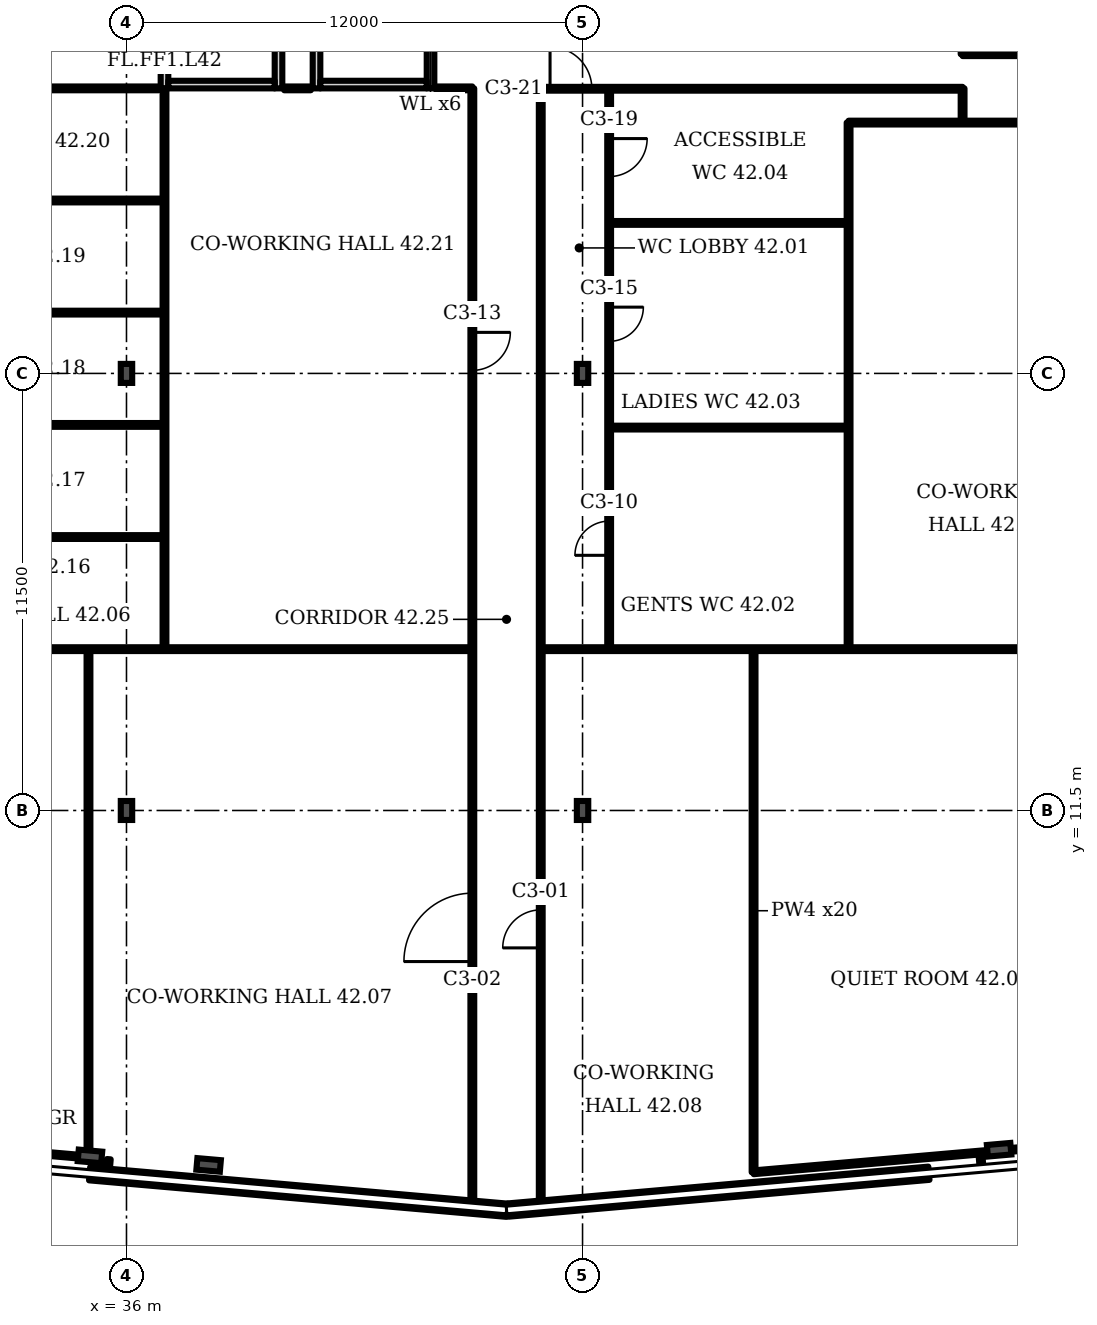
"""IFC4 building model, lengths in metres.
Left out: names, types, materials, properties, quantities, classifications, styles, units other than length and angle.
Written with IfcOpenShell. Run it as: python <this file> out.ifc"""

import sys

from ifc_helpers import new_model, si_unit, direction, frame, frame_2d, origin, origin_2d, place, context, subcontext, project, spatial, rectangle, i_section, extrude, element, fill, save


model = new_model("IFC4")
c1 = context("Model", 3, precision=1e-05, world=origin(), true_north=direction((0.0, 1.0)))
c2 = subcontext(c1, "Body", "Model", "MODEL_VIEW")
j1 = project(units=[si_unit("LENGTHUNIT", "METRE"), si_unit("PLANEANGLEUNIT", "RADIAN")], contexts=[c1])
p1 = place(None, origin())
s1 = spatial("IfcSite", under=j1, at=p1, CompositionType="ELEMENT")
p2 = place(p1, origin())
s2 = spatial("IfcBuilding", under=s1, at=p2, CompositionType="ELEMENT")
p3 = place(p2, frame((0.0, 0.0, 173.5)))
s3 = spatial("IfcBuildingStorey", under=s2, at=p3, CompositionType="ELEMENT", Elevation=173.5)
for number, where, z_axis, x_axis in (
    (1, (35.039, 2.399, 0.0), (0.0, 0.0, 1.0), (-0.087, -0.996, 0.0)),
    (2, (38.161, 2.174, 0.0), (0.0, 0.0, 1.0), (-0.087, -0.996, 0.0)),
    (3, (58.961, 2.573, 0.0), (0.0, 0.0, 1.0), (0.087, -0.996, 0.0)),
):
    element("IfcColumn", number, at=place(p3, frame(where, z_axis=z_axis, x_axis=x_axis)), inside=s3, PredefinedType="COLUMN", context=c2, shape_type="SweptSolid", body=[
        extrude(i_section(OverallWidth=0.305, OverallDepth=0.62, WebThickness=0.021, FlangeThickness=0.04, FilletRadius=0.027, at=origin_2d()), origin(), (0.0, 0.0, 1.0), 3.6),
    ])
for number, where, z_axis, x_axis in (
    (4, (36.0, 11.5, 0.0), (0.0, 0.0, 1.0), (1.0, 0.0, 0.0)),
    (5, (48.0, 11.5, 0.0), (0.0, 0.0, 1.0), (1.0, 0.0, 0.0)),
    (6, (36.0, 23.0, 0.0), (0.0, 0.0, 1.0), (1.0, 0.0, 0.0)),
    (7, (48.0, 23.0, 0.0), (0.0, 0.0, 1.0), (1.0, 0.0, 0.0)),
):
    element("IfcColumn", number, at=place(p3, frame(where, z_axis=z_axis, x_axis=x_axis)), inside=s3, PredefinedType="COLUMN", context=c2, shape_type="SweptSolid", body=[
        extrude(i_section(OverallWidth=0.3, OverallDepth=0.5, WebThickness=0.014, FlangeThickness=0.028, FilletRadius=0.027, at=origin_2d()), origin(), (0.0, 0.0, 1.0), 3.6),
    ])
p4 = place(p3, frame((35.03, 1.943, 0.0), z_axis=(0.0, 0.0, 1.0), x_axis=(0.996199, -0.08714, 0.0)))
e8 = element("IfcWall", 8, at=p4, inside=s3, PredefinedType="SOLIDWALL", context=c2, shape_type="SweptSolid", body=[
    extrude(rectangle(XDim=11.028, YDim=0.35, at=frame_2d((5.514, 0.0))), origin(), (0.0, 0.0, 1.0), 1.0),
])
p5 = place(p3, frame((46.045, 0.987, 0.0), z_axis=(0.0, 0.0, 1.0), x_axis=(0.996193, 0.087171, 0.0)))
e9 = element("IfcWall", 9, at=p5, inside=s3, PredefinedType="SOLIDWALL", context=c2, shape_type="SweptSolid", body=[
    extrude(rectangle(XDim=11.11, YDim=0.35, at=frame_2d((5.555, 0.0))), origin(), (0.0, 0.0, 1.0), 1.0),
])
p6 = place(p3, frame((37.0, 30.5, 0.0), z_axis=(0.0, 0.0, 1.0), x_axis=(0.0, 1.0, 0.0)))
e10 = element("IfcWall", 10, at=p6, inside=s3, PredefinedType="PARTITIONING", context=c2, shape_type="SweptSolid", body=[
    extrude(rectangle(XDim=3.5, YDim=0.2, at=frame_2d((1.75, 0.0))), origin(), (0.0, 0.0, 1.0), 3.2),
])
p7 = place(p6, frame((1.2, 0.0, 0.0)))
e11 = element("IfcOpeningElement", 11, at=p7, cuts=e10, PredefinedType="OPENING", context=c2, shape_type="SweptSolid", body=[
    extrude(rectangle(XDim=1.1, YDim=2.1, at=frame_2d((0.55, 1.05))), frame((0.0, 0.11, 0.0), z_axis=(0.0, -1.0, 0.0), x_axis=(1.0, 0.0, 0.0)), (0.0, 0.0, 1.0), 0.22),
])
p8 = place(p3, frame((40.0, 30.5, 0.0), z_axis=(0.0, 0.0, 1.0), x_axis=(0.0, 1.0, 0.0)))
e12 = element("IfcWall", 12, at=p8, inside=s3, PredefinedType="PARTITIONING", context=c2, shape_type="SweptSolid", body=[
    extrude(rectangle(XDim=3.5, YDim=0.2, at=frame_2d((1.75, 0.0))), origin(), (0.0, 0.0, 1.0), 3.2),
])
p9 = place(p3, frame((37.1, 30.6, 0.0), z_axis=(0.0, 0.0, 1.0), x_axis=(1.0, 0.0, 0.0)))
e13 = element("IfcWall", 13, at=p9, inside=s3, PredefinedType="PARTITIONING", context=c2, shape_type="SweptSolid", body=[
    extrude(rectangle(XDim=2.8, YDim=0.2, at=frame_2d((1.4, 0.0))), origin(), (0.0, 0.0, 1.0), 3.2),
])
p10 = place(p3, frame((41.0, 30.5, 0.0), z_axis=(0.0, 0.0, 1.0), x_axis=(0.0, 1.0, 0.0)))
e14 = element("IfcWall", 14, at=p10, inside=s3, PredefinedType="PARTITIONING", context=c2, shape_type="SweptSolid", body=[
    extrude(rectangle(XDim=3.5, YDim=0.2, at=frame_2d((1.75, 0.0))), origin(), (0.0, 0.0, 1.0), 3.2),
])
p11 = place(p3, frame((44.0, 30.5, 0.0), z_axis=(0.0, 0.0, 1.0), x_axis=(0.0, 1.0, 0.0)))
e15 = element("IfcWall", 15, at=p11, inside=s3, PredefinedType="PARTITIONING", context=c2, shape_type="SweptSolid", body=[
    extrude(rectangle(XDim=3.5, YDim=0.2, at=frame_2d((1.75, 0.0))), origin(), (0.0, 0.0, 1.0), 3.2),
])
p12 = place(p11, frame((1.2, 0.0, 0.0)))
e16 = element("IfcOpeningElement", 16, at=p12, cuts=e15, PredefinedType="OPENING", context=c2, shape_type="SweptSolid", body=[
    extrude(rectangle(XDim=1.1, YDim=2.1, at=frame_2d((0.55, 1.05))), frame((0.0, 0.11, 0.0), z_axis=(0.0, -1.0, 0.0), x_axis=(1.0, 0.0, 0.0)), (0.0, 0.0, 1.0), 0.22),
])
p13 = place(p3, frame((41.1, 30.6, 0.0), z_axis=(0.0, 0.0, 1.0), x_axis=(1.0, 0.0, 0.0)))
e17 = element("IfcWall", 17, at=p13, inside=s3, PredefinedType="PARTITIONING", context=c2, shape_type="SweptSolid", body=[
    extrude(rectangle(XDim=2.8, YDim=0.2, at=frame_2d((1.4, 0.0))), origin(), (0.0, 0.0, 1.0), 3.2),
])
p14 = place(p3, frame((27.4, 15.745, 0.0), z_axis=(0.0, 0.0, 1.0), x_axis=(1.0, 0.0, 0.0)))
e18 = element("IfcWall", 18, at=p14, inside=s3, PredefinedType="PARTITIONING", context=c2, shape_type="SweptSolid", body=[
    extrude(rectangle(XDim=17.7, YDim=0.1, at=frame_2d((8.85, 0.0))), origin(), (0.0, 0.0, 1.0), 3.2),
])
for number, where, z_axis, x_axis in (
    (19, (27.4, 18.695, 0.0), (0.0, 0.0, 1.0), (1.0, 0.0, 0.0)),
    (20, (27.4, 21.645, 0.0), (0.0, 0.0, 1.0), (1.0, 0.0, 0.0)),
    (21, (27.4, 24.6, 0.0), (0.0, 0.0, 1.0), (1.0, 0.0, 0.0)),
    (22, (27.4, 27.55, 0.0), (0.0, 0.0, 1.0), (1.0, 0.0, 0.0)),
):
    element("IfcWall", number, at=place(p3, frame(where, z_axis=z_axis, x_axis=x_axis)), inside=s3, PredefinedType="PARTITIONING", context=c2, shape_type="SweptSolid", body=[
        extrude(rectangle(XDim=9.6, YDim=0.1, at=frame_2d((4.8, 0.0))), origin(), (0.0, 0.0, 1.0), 3.2),
    ])
p15 = place(p3, frame((27.4, 30.5, 0.0), z_axis=(0.0, 0.0, 1.0), x_axis=(1.0, 0.0, 0.0)))
e23 = element("IfcWall", 23, at=p15, inside=s3, PredefinedType="PARTITIONING", context=c2, shape_type="SweptSolid", body=[
    extrude(rectangle(XDim=9.45, YDim=0.1, at=frame_2d((4.725, 0.0))), origin(), (0.0, 0.0, 1.0), 3.2),
])
p16 = place(p15, frame((2.87, 0.0, 0.0)))
e24 = element("IfcOpeningElement", 24, at=p16, cuts=e23, PredefinedType="OPENING", context=c2, shape_type="SweptSolid", body=[
    extrude(rectangle(XDim=1.0, YDim=2.1, at=frame_2d((0.5, 1.05))), frame((0.0, 0.06, 0.0), z_axis=(0.0, -1.0, 0.0), x_axis=(1.0, 0.0, 0.0)), (0.0, 0.0, 1.0), 0.12),
])
p17 = place(p3, frame((35.0, 2.37, 0.0), z_axis=(0.0, 0.0, 1.0), x_axis=(-0.996265, 0.086343, 0.0)))
e25 = element("IfcWall", 25, at=p17, inside=s3, PredefinedType="PARTITIONING", context=c2, shape_type="SweptSolid", body=[
    extrude(rectangle(XDim=1.948, YDim=0.1, at=frame_2d((0.974, 0.0))), origin(), (0.0, 0.0, 1.0), 2.58),
])
p18 = place(p3, frame((35.0, 2.37, 0.0), z_axis=(0.0, 0.0, 1.0), x_axis=(0.0, 1.0, 0.0)))
e26 = element("IfcWall", 26, at=p18, inside=s3, PredefinedType="PARTITIONING", context=c2, shape_type="SweptSolid", body=[
    extrude(rectangle(XDim=13.375, YDim=0.1, at=frame_2d((6.688, 0.0))), origin(), (0.0, 0.0, 1.0), 3.2),
])
p19 = place(p3, frame((35.502, 1.927, 0.0), z_axis=(0.0, 0.0, 1.0), x_axis=(0.083045, 0.996542, 0.0)))
e27 = element("IfcWall", 27, at=p19, inside=s3, PredefinedType="PARTITIONING", context=c2, shape_type="SweptSolid", body=[
    extrude(rectangle(XDim=0.4, YDim=0.1, at=frame_2d((0.2, 0.0))), origin(), (0.0, 0.0, 1.0), 3.2),
])
p20 = place(p3, frame((37.0, 15.745, 0.0), z_axis=(0.0, 0.0, 1.0), x_axis=(0.0, 1.0, 0.0)))
e28 = element("IfcWall", 28, at=p20, inside=s3, PredefinedType="PARTITIONING", context=c2, shape_type="SweptSolid", body=[
    extrude(rectangle(XDim=14.755, YDim=0.1, at=frame_2d((7.377, 0.0))), origin(), (0.0, 0.0, 1.0), 3.2),
])
p21 = place(p3, frame((45.1, 1.087, 0.0), z_axis=(0.0, 0.0, 1.0), x_axis=(0.0, 1.0, 0.0)))
e29 = element("IfcWall", 29, at=p21, inside=s3, PredefinedType="PARTITIONING", context=c2, shape_type="SweptSolid", body=[
    extrude(rectangle(XDim=29.413, YDim=0.1, at=frame_2d((14.707, 0.0))), origin(), (0.0, 0.0, 1.0), 3.2),
])
p22 = place(p21, frame((6.438, 0.0, 0.0)))
e30 = element("IfcOpeningElement", 30, at=p22, cuts=e29, PredefinedType="OPENING", context=c2, shape_type="SweptSolid", body=[
    extrude(rectangle(XDim=1.8, YDim=2.1, at=frame_2d((0.9, 1.05))), frame((0.0, 0.06, 0.0), z_axis=(0.0, -1.0, 0.0), x_axis=(1.0, 0.0, 0.0)), (0.0, 0.0, 1.0), 0.12),
])
p23 = place(p21, frame((21.993, 0.0, 0.0)))
e31 = element("IfcOpeningElement", 31, at=p23, cuts=e29, PredefinedType="OPENING", context=c2, shape_type="SweptSolid", body=[
    extrude(rectangle(XDim=1.0, YDim=2.1, at=frame_2d((0.5, 1.05))), frame((0.0, 0.06, 0.0), z_axis=(0.0, -1.0, 0.0), x_axis=(1.0, 0.0, 0.0)), (0.0, 0.0, 1.0), 0.12),
])
p24 = place(p3, frame((46.9, 1.087, 0.0), z_axis=(0.0, 0.0, 1.0), x_axis=(0.0, 1.0, 0.0)))
e32 = element("IfcWall", 32, at=p24, inside=s3, PredefinedType="PARTITIONING", context=c2, shape_type="SweptSolid", body=[
    extrude(rectangle(XDim=29.403, YDim=0.1, at=frame_2d((14.702, 0.0))), origin(), (0.0, 0.0, 1.0), 3.2),
])
p25 = place(p24, frame((6.798, 0.0, 0.0)))
e33 = element("IfcOpeningElement", 33, at=p25, cuts=e32, PredefinedType="OPENING", context=c2, shape_type="SweptSolid", body=[
    extrude(rectangle(XDim=1.0, YDim=2.1, at=frame_2d((0.5, 1.05))), frame((0.0, 0.06, 0.0), z_axis=(0.0, -1.0, 0.0), x_axis=(1.0, 0.0, 0.0)), (0.0, 0.0, 1.0), 0.12),
])
p26 = place(p3, frame((46.91, 15.745, 0.0), z_axis=(0.0, 0.0, 1.0), x_axis=(1.0, 0.0, 0.0)))
e34 = element("IfcWall", 34, at=p26, inside=s3, PredefinedType="PARTITIONING", context=c2, shape_type="SweptSolid", body=[
    extrude(rectangle(XDim=17.69, YDim=0.1, at=frame_2d((8.845, 0.0))), origin(), (0.0, 0.0, 1.0), 3.2),
])
p27 = place(p3, frame((46.91, 30.49, 0.0), z_axis=(0.0, 0.0, 1.0), x_axis=(1.0, 0.0, 0.0)))
e35 = element("IfcWall", 35, at=p27, inside=s3, PredefinedType="PARTITIONING", context=c2, shape_type="SweptSolid", body=[
    extrude(rectangle(XDim=11.09, YDim=0.1, at=frame_2d((5.545, 0.0))), origin(), (0.0, 0.0, 1.0), 3.2),
])
p28 = place(p27, frame((0.235, 0.0, 0.0)))
e36 = element("IfcOpeningElement", 36, at=p28, cuts=e35, PredefinedType="OPENING", context=c2, shape_type="SweptSolid", body=[
    extrude(rectangle(XDim=1.1, YDim=2.1, at=frame_2d((0.55, 1.05))), frame((0.0, 0.06, 0.0), z_axis=(0.0, -1.0, 0.0), x_axis=(1.0, 0.0, 0.0)), (0.0, 0.0, 1.0), 0.12),
])
p29 = place(p3, frame((48.7, 15.745, 0.0), z_axis=(0.0, 0.0, 1.0), x_axis=(0.0, 1.0, 0.0)))
e37 = element("IfcWall", 37, at=p29, inside=s3, PredefinedType="PARTITIONING", context=c2, shape_type="SweptSolid", body=[
    extrude(rectangle(XDim=14.745, YDim=0.1, at=frame_2d((7.373, 0.0))), origin(), (0.0, 0.0, 1.0), 3.2),
])
p30 = place(p29, frame((2.469, 0.0, 0.0)))
e38 = element("IfcOpeningElement", 38, at=p30, cuts=e37, PredefinedType="OPENING", context=c2, shape_type="SweptSolid", body=[
    extrude(rectangle(XDim=0.9, YDim=2.1, at=frame_2d((0.45, 1.05))), frame((0.0, 0.06, 0.0), z_axis=(0.0, -1.0, 0.0), x_axis=(1.0, 0.0, 0.0)), (0.0, 0.0, 1.0), 0.12),
])
p31 = place(p29, frame((8.099, 0.0, 0.0)))
e39 = element("IfcOpeningElement", 39, at=p31, cuts=e37, PredefinedType="OPENING", context=c2, shape_type="SweptSolid", body=[
    extrude(rectangle(XDim=0.9, YDim=2.1, at=frame_2d((0.45, 1.05))), frame((0.0, 0.06, 0.0), z_axis=(0.0, -1.0, 0.0), x_axis=(1.0, 0.0, 0.0)), (0.0, 0.0, 1.0), 0.12),
])
p32 = place(p29, frame((12.434, 0.0, 0.0)))
e40 = element("IfcOpeningElement", 40, at=p32, cuts=e37, PredefinedType="OPENING", context=c2, shape_type="SweptSolid", body=[
    extrude(rectangle(XDim=1.0, YDim=2.1, at=frame_2d((0.5, 1.05))), frame((0.0, 0.06, 0.0), z_axis=(0.0, -1.0, 0.0), x_axis=(1.0, 0.0, 0.0)), (0.0, 0.0, 1.0), 0.12),
])
for number, where, z_axis, x_axis in (
    (41, (48.7, 21.575, 0.0), (0.0, 0.0, 1.0), (1.0, 0.0, 0.0)),
    (42, (48.7, 26.96, 0.0), (0.0, 0.0, 1.0), (1.0, 0.0, 0.0)),
):
    element("IfcWall", number, at=place(p3, frame(where, z_axis=z_axis, x_axis=x_axis)), inside=s3, PredefinedType="PARTITIONING", context=c2, shape_type="SweptSolid", body=[
        extrude(rectangle(XDim=6.3, YDim=0.1, at=frame_2d((3.15, 0.0))), origin(), (0.0, 0.0, 1.0), 3.2),
    ])
p33 = place(p3, frame((52.5, 1.98, 0.0), z_axis=(0.0, 0.0, 1.0), x_axis=(0.0, 1.0, 0.0)))
e43 = element("IfcWall", 43, at=p33, inside=s3, PredefinedType="PARTITIONING", context=c2, shape_type="SweptSolid", body=[
    extrude(rectangle(XDim=13.765, YDim=0.1, at=frame_2d((6.883, 0.0))), origin(), (0.0, 0.0, 1.0), 3.2),
])
p34 = place(p3, frame((52.5, 1.98, 0.0), z_axis=(0.0, 0.0, 1.0), x_axis=(0.99622, 0.086844, 0.0)))
e44 = element("IfcWall", 44, at=p34, inside=s3, PredefinedType="PARTITIONING", context=c2, shape_type="SweptSolid", body=[
    extrude(rectangle(XDim=9.328, YDim=0.1, at=frame_2d((4.664, 0.0))), origin(), (0.0, 0.0, 1.0), 2.58),
])
p35 = place(p3, frame((55.0, 15.745, 0.0), z_axis=(0.0, 0.0, 1.0), x_axis=(0.0, 1.0, 0.0)))
e45 = element("IfcWall", 45, at=p35, inside=s3, PredefinedType="PARTITIONING", context=c2, shape_type="SweptSolid", body=[
    extrude(rectangle(XDim=13.855, YDim=0.1, at=frame_2d((6.927, 0.0))), origin(), (0.0, 0.0, 1.0), 3.2),
])
p36 = place(p3, frame((55.0, 29.6, 0.0), z_axis=(0.0, 0.0, 1.0), x_axis=(1.0, 0.0, 0.0)))
e46 = element("IfcWall", 46, at=p36, inside=s3, PredefinedType="PARTITIONING", context=c2, shape_type="SweptSolid", body=[
    extrude(rectangle(XDim=6.44, YDim=0.1, at=frame_2d((3.22, 0.0))), origin(), (0.0, 0.0, 1.0), 3.2),
])
p37 = place(p3, frame((58.0, 29.6, 0.0), z_axis=(0.0, 0.0, 1.0), x_axis=(0.0, 1.0, 0.0)))
e47 = element("IfcWall", 47, at=p37, inside=s3, PredefinedType="PARTITIONING", context=c2, shape_type="SweptSolid", body=[
    extrude(rectangle(XDim=0.9, YDim=0.1, at=frame_2d((0.45, 0.0))), origin(), (0.0, 0.0, 1.0), 3.2),
])
p38 = place(p3, frame((58.0, 31.4, 0.0), z_axis=(0.0, 0.0, 1.0), x_axis=(0.0, 1.0, 0.0)))
e48 = element("IfcWall", 48, at=p38, inside=s3, PredefinedType="PARTITIONING", context=c2, shape_type="SweptSolid", body=[
    extrude(rectangle(XDim=2.58, YDim=0.1, at=frame_2d((1.29, 0.0))), origin(), (0.0, 0.0, 1.0), 3.2),
])
p39 = place(p3, frame((58.0, 31.4, 0.0), z_axis=(0.0, 0.0, 1.0), x_axis=(1.0, 0.0, 0.0)))
e49 = element("IfcWall", 49, at=p39, inside=s3, PredefinedType="PARTITIONING", context=c2, shape_type="SweptSolid", body=[
    extrude(rectangle(XDim=8.4, YDim=0.1, at=frame_2d((4.2, 0.0))), origin(), (0.0, 0.0, 1.0), 3.2),
])
p40 = place(p39, frame((3.98, 0.0, 0.0)))
e50 = element("IfcOpeningElement", 50, at=p40, cuts=e49, PredefinedType="OPENING", context=c2, shape_type="SweptSolid", body=[
    extrude(rectangle(XDim=1.8, YDim=2.1, at=frame_2d((0.9, 1.05))), frame((0.0, 0.06, 0.0), z_axis=(0.0, -1.0, 0.0), x_axis=(1.0, 0.0, 0.0)), (0.0, 0.0, 1.0), 0.12),
])
p41 = place(p3, frame((58.498, 2.102, 0.0), z_axis=(0.0, 0.0, 1.0), x_axis=(-0.083045, 0.996542, 0.0)))
e51 = element("IfcWall", 51, at=p41, inside=s3, PredefinedType="PARTITIONING", context=c2, shape_type="SweptSolid", body=[
    extrude(rectangle(XDim=0.4, YDim=0.1, at=frame_2d((0.2, 0.0))), origin(), (0.0, 0.0, 1.0), 3.2),
])
p42 = place(p3, frame((40.15, 30.5, 0.0), z_axis=(0.0, 0.0, 1.0), x_axis=(1.0, 0.0, 0.0)))
e52 = element("IfcWall", 52, at=p42, inside=s3, PredefinedType="PARTITIONING", context=c2, shape_type="SweptSolid", body=[
    extrude(rectangle(XDim=0.7, YDim=0.1, at=frame_2d((0.35, 0.0))), origin(), (0.0, 0.0, 1.0), 3.2),
])
p43 = place(p3, frame((44.15, 30.5, 0.0), z_axis=(0.0, 0.0, 1.0), x_axis=(1.0, 0.0, 0.0)))
e53 = element("IfcWall", 53, at=p43, inside=s3, PredefinedType="PARTITIONING", context=c2, shape_type="SweptSolid", body=[
    extrude(rectangle(XDim=0.95, YDim=0.1, at=frame_2d((0.475, 0.0))), origin(), (0.0, 0.0, 1.0), 3.2),
])
p44 = place(p25, origin())
e54 = element("IfcDoor", 54, at=p44, inside=s3, OperationType="SINGLE_SWING_LEFT", PredefinedType="DOOR", context=c2, shape_type="SweptSolid", body=[
    extrude(rectangle(XDim=1.0, YDim=2.1, at=frame_2d((0.5, 1.05))), frame((0.0, 0.025, 0.0), z_axis=(0.0, -1.0, 0.0), x_axis=(1.0, 0.0, 0.0)), (0.0, 0.0, 1.0), 0.05),
])
fill(e33, e54)
p45 = place(p22, origin())
e55 = element("IfcDoor", 55, at=p45, inside=s3, OperationType="DOUBLE_DOOR_SINGLE_SWING", PredefinedType="DOOR", context=c2, shape_type="SweptSolid", body=[
    extrude(rectangle(XDim=1.8, YDim=2.1, at=frame_2d((0.9, 1.05))), frame((0.0, 0.025, 0.0), z_axis=(0.0, -1.0, 0.0), x_axis=(1.0, 0.0, 0.0)), (0.0, 0.0, 1.0), 0.05),
])
fill(e30, e55)
p46 = place(p30, origin())
e56 = element("IfcDoor", 56, at=p46, inside=s3, OperationType="SINGLE_SWING_LEFT", PredefinedType="DOOR", context=c2, shape_type="SweptSolid", body=[
    extrude(rectangle(XDim=0.9, YDim=2.1, at=frame_2d((0.45, 1.05))), frame((0.0, 0.025, 0.0), z_axis=(0.0, -1.0, 0.0), x_axis=(1.0, 0.0, 0.0)), (0.0, 0.0, 1.0), 0.05),
])
fill(e38, e56)
p47 = place(p23, origin())
e57 = element("IfcDoor", 57, at=p47, inside=s3, OperationType="SINGLE_SWING_RIGHT", PredefinedType="DOOR", context=c2, shape_type="SweptSolid", body=[
    extrude(rectangle(XDim=1.0, YDim=2.1, at=frame_2d((0.5, 1.05))), frame((0.0, 0.025, 0.0), z_axis=(0.0, -1.0, 0.0), x_axis=(1.0, 0.0, 0.0)), (0.0, 0.0, 1.0), 0.05),
])
fill(e31, e57)
p48 = place(p31, origin())
e58 = element("IfcDoor", 58, at=p48, inside=s3, OperationType="SINGLE_SWING_RIGHT", PredefinedType="DOOR", context=c2, shape_type="SweptSolid", body=[
    extrude(rectangle(XDim=0.9, YDim=2.1, at=frame_2d((0.45, 1.05))), frame((0.0, 0.025, 0.0), z_axis=(0.0, -1.0, 0.0), x_axis=(1.0, 0.0, 0.0)), (0.0, 0.0, 1.0), 0.05),
])
fill(e39, e58)
p49 = place(p32, origin())
e59 = element("IfcDoor", 59, at=p49, inside=s3, OperationType="SINGLE_SWING_RIGHT", PredefinedType="DOOR", context=c2, shape_type="SweptSolid", body=[
    extrude(rectangle(XDim=1.0, YDim=2.1, at=frame_2d((0.5, 1.05))), frame((0.0, 0.025, 0.0), z_axis=(0.0, -1.0, 0.0), x_axis=(1.0, 0.0, 0.0)), (0.0, 0.0, 1.0), 0.05),
])
fill(e40, e59)
p50 = place(p28, origin())
e60 = element("IfcDoor", 60, at=p50, inside=s3, OperationType="SINGLE_SWING_LEFT", PredefinedType="DOOR", context=c2, shape_type="SweptSolid", body=[
    extrude(rectangle(XDim=1.1, YDim=2.1, at=frame_2d((0.55, 1.05))), frame((0.0, 0.025, 0.0), z_axis=(0.0, -1.0, 0.0), x_axis=(1.0, 0.0, 0.0)), (0.0, 0.0, 1.0), 0.05),
])
fill(e36, e60)
save(model, sys.argv[1])
